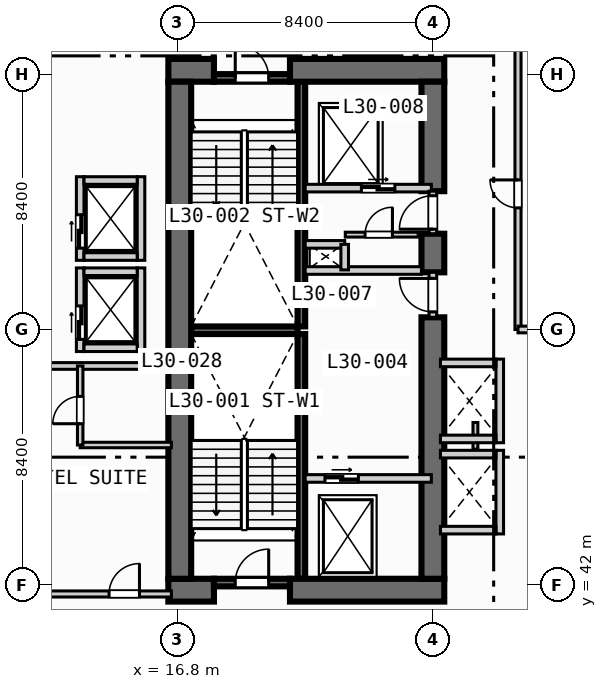
"""IFC4 building model, lengths in metres.
Left out: names, types, materials, properties, quantities, classifications, styles, units other than length and angle.
Written with IfcOpenShell. Run it as: python <this file> out.ifc"""

import sys

from ifc_helpers import new_model, si_unit, direction, frame, frame_2d, origin, place, context, subcontext, project, spatial, rectangle, extrude, element, fill, save


model = new_model("IFC4")
c1 = context("Model", 3, precision=1e-05, world=origin(), true_north=direction((0.0, 1.0)))
c2 = subcontext(c1, "Body", "Model", "MODEL_VIEW")
j1 = project(units=[si_unit("LENGTHUNIT", "METRE"), si_unit("PLANEANGLEUNIT", "RADIAN")], contexts=[c1])
p1 = place(None, origin())
s1 = spatial("IfcSite", under=j1, at=p1, CompositionType="ELEMENT")
p2 = place(p1, origin())
s2 = spatial("IfcBuilding", under=s1, at=p2, CompositionType="ELEMENT")
p3 = place(p2, frame((0.0, 0.0, 126.6)))
s3 = spatial("IfcBuildingStorey", under=s2, at=p3, CompositionType="ELEMENT", Elevation=126.6)
for number, where, z_axis, x_axis in (
    (1, (20.875, 42.2, 0.0), (0.0, 0.0, 1.0), (0.0, 1.0, 0.0)),
    (2, (20.875, 50.5, 0.0), (0.0, 0.0, 1.0), (0.0, 1.0, 0.0)),
):
    element("IfcWall", number, at=place(p3, frame(where, z_axis=z_axis, x_axis=x_axis)), inside=s3, PredefinedType="SOLIDWALL", context=c2, shape_type="SweptSolid", body=[
        extrude(rectangle(XDim=8.05, YDim=0.25, at=frame_2d((4.025, 0.0))), origin(), (0.0, 0.0, 1.0), 3.55),
    ])
p4 = place(p3, frame((17.25, 50.375, 0.0), z_axis=(0.0, 0.0, 1.0), x_axis=(1.0, 0.0, 0.0)))
e3 = element("IfcWall", 3, at=p4, inside=s3, PredefinedType="SOLIDWALL", context=c2, shape_type="SweptSolid", body=[
    extrude(rectangle(XDim=3.5, YDim=0.25, at=frame_2d((1.75, 0.0))), origin(), (0.0, 0.0, 1.0), 3.55),
])
p5 = place(p3, frame((16.5, 41.825, 0.0), z_axis=(0.0, 0.0, 1.0), x_axis=(1.0, 0.0, 0.0)))
e4 = element("IfcWall", 4, at=p5, inside=s3, PredefinedType="SHEAR", context=c2, shape_type="SweptSolid", body=[
    extrude(rectangle(XDim=1.5, YDim=0.75, at=frame_2d((0.75, 0.0))), origin(), (0.0, 0.0, 1.0), 3.55),
])
p6 = place(p3, frame((20.5, 41.825, 0.0), z_axis=(0.0, 0.0, 1.0), x_axis=(1.0, 0.0, 0.0)))
e5 = element("IfcWall", 5, at=p6, inside=s3, PredefinedType="SHEAR", context=c2, shape_type="SweptSolid", body=[
    extrude(rectangle(XDim=5.075, YDim=0.75, at=frame_2d((2.538, 0.0))), origin(), (0.0, 0.0, 1.0), 3.55),
])
p7 = place(p3, frame((16.5, 58.925, 0.0), z_axis=(0.0, 0.0, 1.0), x_axis=(1.0, 0.0, 0.0)))
e6 = element("IfcWall", 6, at=p7, inside=s3, PredefinedType="SHEAR", context=c2, shape_type="SweptSolid", body=[
    extrude(rectangle(XDim=1.5, YDim=0.75, at=frame_2d((0.75, 0.0))), origin(), (0.0, 0.0, 1.0), 3.55),
])
p8 = place(p3, frame((20.5, 58.925, 0.0), z_axis=(0.0, 0.0, 1.0), x_axis=(1.0, 0.0, 0.0)))
e7 = element("IfcWall", 7, at=p8, inside=s3, PredefinedType="SHEAR", context=c2, shape_type="SweptSolid", body=[
    extrude(rectangle(XDim=5.075, YDim=0.75, at=frame_2d((2.538, 0.0))), origin(), (0.0, 0.0, 1.0), 3.55),
])
p9 = place(p3, frame((16.875, 42.2, 0.0), z_axis=(0.0, 0.0, 1.0), x_axis=(0.0, 1.0, 0.0)))
e8 = element("IfcWall", 8, at=p9, inside=s3, PredefinedType="SHEAR", context=c2, shape_type="SweptSolid", body=[
    extrude(rectangle(XDim=16.35, YDim=0.75, at=frame_2d((8.175, 0.0))), origin(), (0.0, 0.0, 1.0), 3.55),
])
p10 = place(p3, frame((25.2, 42.2, 0.0), z_axis=(0.0, 0.0, 1.0), x_axis=(0.0, 1.0, 0.0)))
e9 = element("IfcWall", 9, at=p10, inside=s3, PredefinedType="SHEAR", context=c2, shape_type="SweptSolid", body=[
    extrude(rectangle(XDim=8.6, YDim=0.75, at=frame_2d((4.3, 0.0))), origin(), (0.0, 0.0, 1.0), 3.55),
])
p11 = place(p3, frame((25.2, 52.28, 0.0), z_axis=(0.0, 0.0, 1.0), x_axis=(0.0, 1.0, 0.0)))
e10 = element("IfcWall", 10, at=p11, inside=s3, PredefinedType="SHEAR", context=c2, shape_type="SweptSolid", body=[
    extrude(rectangle(XDim=1.27, YDim=0.75, at=frame_2d((0.635, 0.0))), origin(), (0.0, 0.0, 1.0), 3.55),
])
p12 = place(p3, frame((25.2, 54.95, 0.0), z_axis=(0.0, 0.0, 1.0), x_axis=(0.0, 1.0, 0.0)))
e11 = element("IfcWall", 11, at=p12, inside=s3, PredefinedType="SHEAR", context=c2, shape_type="SweptSolid", body=[
    extrude(rectangle(XDim=3.6, YDim=0.75, at=frame_2d((1.8, 0.0))), origin(), (0.0, 0.0, 1.0), 3.55),
])
p13 = place(p3, frame((18.0, 42.075, 0.0), z_axis=(0.0, 0.0, 1.0), x_axis=(1.0, 0.0, 0.0)))
e12 = element("IfcWall", 12, at=p13, inside=s3, PredefinedType="SOLIDWALL", context=c2, shape_type="SweptSolid", body=[
    extrude(rectangle(XDim=2.5, YDim=0.25, at=frame_2d((1.25, 0.0))), origin(), (0.0, 0.0, 1.0), 3.55),
])
p14 = place(p13, frame((0.7, 0.0, 0.0)))
e13 = element("IfcOpeningElement", 13, at=p14, cuts=e12, PredefinedType="OPENING", context=c2, shape_type="SweptSolid", body=[
    extrude(rectangle(XDim=1.1, YDim=2.15, at=frame_2d((0.55, 1.075))), frame((0.0, 0.135, 0.0), z_axis=(0.0, -1.0, 0.0), x_axis=(1.0, 0.0, 0.0)), (0.0, 0.0, 1.0), 0.27),
])
p15 = place(p3, frame((18.0, 58.675, 0.0), z_axis=(0.0, 0.0, 1.0), x_axis=(1.0, 0.0, 0.0)))
e14 = element("IfcWall", 14, at=p15, inside=s3, PredefinedType="SOLIDWALL", context=c2, shape_type="SweptSolid", body=[
    extrude(rectangle(XDim=2.5, YDim=0.25, at=frame_2d((1.25, 0.0))), origin(), (0.0, 0.0, 1.0), 3.55),
])
p16 = place(p15, frame((0.7, 0.0, 0.0)))
e15 = element("IfcOpeningElement", 15, at=p16, cuts=e14, PredefinedType="OPENING", context=c2, shape_type="SweptSolid", body=[
    extrude(rectangle(XDim=1.1, YDim=2.15, at=frame_2d((0.55, 1.075))), frame((0.0, 0.135, 0.0), z_axis=(0.0, -1.0, 0.0), x_axis=(1.0, 0.0, 0.0)), (0.0, 0.0, 1.0), 0.27),
])
p17 = place(p3, frame((21.0, 45.5, 0.0), z_axis=(0.0, 0.0, 1.0), x_axis=(1.0, 0.0, 0.0)))
e16 = element("IfcWall", 16, at=p17, inside=s3, PredefinedType="SOLIDWALL", context=c2, shape_type="SweptSolid", body=[
    extrude(rectangle(XDim=4.15, YDim=0.25, at=frame_2d((2.075, 0.0))), origin(), (0.0, 0.0, 1.0), 3.55),
])
p18 = place(p17, frame((0.65, 0.0, 0.0)))
e17 = element("IfcOpeningElement", 17, at=p18, cuts=e16, PredefinedType="OPENING", context=c2, shape_type="SweptSolid", body=[
    extrude(rectangle(XDim=1.1, YDim=2.15, at=frame_2d((0.55, 1.075))), frame((0.0, 0.135, 0.0), z_axis=(0.0, -1.0, 0.0), x_axis=(1.0, 0.0, 0.0)), (0.0, 0.0, 1.0), 0.27),
])
p19 = place(p3, frame((25.2, 50.8, 0.0), z_axis=(0.0, 0.0, 1.0), x_axis=(0.0, 1.0, 0.0)))
e18 = element("IfcWall", 18, at=p19, inside=s3, PredefinedType="SOLIDWALL", context=c2, shape_type="SweptSolid", body=[
    extrude(rectangle(XDim=1.48, YDim=0.25, at=frame_2d((0.74, 0.0))), origin(), (0.0, 0.0, 1.0), 3.55),
])
p20 = place(p19, frame((0.18, 0.0, 0.0)))
e19 = element("IfcOpeningElement", 19, at=p20, cuts=e18, PredefinedType="OPENING", context=c2, shape_type="SweptSolid", body=[
    extrude(rectangle(XDim=1.1, YDim=2.15, at=frame_2d((0.55, 1.075))), frame((0.0, 0.135, 0.0), z_axis=(0.0, -1.0, 0.0), x_axis=(1.0, 0.0, 0.0)), (0.0, 0.0, 1.0), 0.27),
])
p21 = place(p3, frame((21.0, 52.34, 0.0), z_axis=(0.0, 0.0, 1.0), x_axis=(1.0, 0.0, 0.0)))
e20 = element("IfcWall", 20, at=p21, inside=s3, PredefinedType="SOLIDWALL", context=c2, shape_type="SweptSolid", body=[
    extrude(rectangle(XDim=3.825, YDim=0.25, at=frame_2d((1.913, 0.0))), origin(), (0.0, 0.0, 1.0), 3.55),
])
p22 = place(p3, frame((21.0, 55.05, 0.0), z_axis=(0.0, 0.0, 1.0), x_axis=(1.0, 0.0, 0.0)))
e21 = element("IfcWall", 21, at=p22, inside=s3, PredefinedType="SOLIDWALL", context=c2, shape_type="SweptSolid", body=[
    extrude(rectangle(XDim=4.15, YDim=0.25, at=frame_2d((2.075, 0.0))), origin(), (0.0, 0.0, 1.0), 3.55),
])
p23 = place(p22, frame((1.85, 0.0, 0.0)))
e22 = element("IfcOpeningElement", 22, at=p23, cuts=e21, PredefinedType="OPENING", context=c2, shape_type="SweptSolid", body=[
    extrude(rectangle(XDim=1.1, YDim=2.15, at=frame_2d((0.55, 1.075))), frame((0.0, 0.135, 0.0), z_axis=(0.0, -1.0, 0.0), x_axis=(1.0, 0.0, 0.0)), (0.0, 0.0, 1.0), 0.27),
])
p24 = place(p3, frame((25.2, 53.55, 0.0), z_axis=(0.0, 0.0, 1.0), x_axis=(0.0, 1.0, 0.0)))
e23 = element("IfcWall", 23, at=p24, inside=s3, PredefinedType="SOLIDWALL", context=c2, shape_type="SweptSolid", body=[
    extrude(rectangle(XDim=1.4, YDim=0.25, at=frame_2d((0.7, 0.0))), origin(), (0.0, 0.0, 1.0), 3.55),
])
p25 = place(p24, frame((0.15, 0.0, 0.0)))
e24 = element("IfcOpeningElement", 24, at=p25, cuts=e23, PredefinedType="OPENING", context=c2, shape_type="SweptSolid", body=[
    extrude(rectangle(XDim=1.1, YDim=2.15, at=frame_2d((0.55, 1.075))), frame((0.0, 0.135, 0.0), z_axis=(0.0, -1.0, 0.0), x_axis=(1.0, 0.0, 0.0)), (0.0, 0.0, 1.0), 0.27),
])
p26 = place(p3, frame((21.0, 53.2, 0.0), z_axis=(0.0, 0.0, 1.0), x_axis=(1.0, 0.0, 0.0)))
e25 = element("IfcWall", 25, at=p26, inside=s3, PredefinedType="SOLIDWALL", context=c2, shape_type="SweptSolid", body=[
    extrude(rectangle(XDim=1.3, YDim=0.25, at=frame_2d((0.65, 0.0))), origin(), (0.0, 0.0, 1.0), 3.55),
])
p27 = place(p3, frame((22.3, 52.36, 0.0), z_axis=(0.0, 0.0, 1.0), x_axis=(0.0, 1.0, 0.0)))
e26 = element("IfcWall", 26, at=p27, inside=s3, PredefinedType="SOLIDWALL", context=c2, shape_type="SweptSolid", body=[
    extrude(rectangle(XDim=0.84, YDim=0.25, at=frame_2d((0.42, 0.0))), origin(), (0.0, 0.0, 1.0), 3.55),
])
p28 = place(p3, frame((22.32, 53.52, 0.0), z_axis=(0.0, 0.0, 1.0), x_axis=(1.0, 0.0, 0.0)))
e27 = element("IfcWall", 27, at=p28, inside=s3, PredefinedType="PARTITIONING", context=c2, shape_type="SweptSolid", body=[
    extrude(rectangle(XDim=2.4, YDim=0.16, at=frame_2d((1.2, 0.0))), origin(), (0.0, 0.0, 1.0), 3.55),
])
p29 = place(p28, frame((0.65, 0.0, 0.0)))
e28 = element("IfcOpeningElement", 28, at=p29, cuts=e27, PredefinedType="OPENING", context=c2, shape_type="SweptSolid", body=[
    extrude(rectangle(XDim=0.9, YDim=2.1, at=frame_2d((0.45, 1.05))), frame((0.0, 0.09, 0.0), z_axis=(0.0, -1.0, 0.0), x_axis=(1.0, 0.0, 0.0)), (0.0, 0.0, 1.0), 0.18),
])
p30 = place(p3, frame((13.6, 49.675, 0.0), z_axis=(0.0, 0.0, 1.0), x_axis=(0.0, 1.0, 0.0)))
e29 = element("IfcWall", 29, at=p30, inside=s3, PredefinedType="SOLIDWALL", context=c2, shape_type="SweptSolid", body=[
    extrude(rectangle(XDim=2.75, YDim=0.25, at=frame_2d((1.375, 0.0))), origin(), (0.0, 0.0, 1.0), 3.55),
])
p31 = place(p30, frame((0.4, 0.0, 0.0)))
e30 = element("IfcOpeningElement", 30, at=p31, cuts=e29, PredefinedType="OPENING", context=c2, shape_type="SweptSolid", body=[
    extrude(rectangle(XDim=1.1, YDim=2.15, at=frame_2d((0.55, 1.075))), frame((0.0, 0.135, 0.0), z_axis=(0.0, -1.0, 0.0), x_axis=(1.0, 0.0, 0.0)), (0.0, 0.0, 1.0), 0.27),
])
p32 = place(p3, frame((15.6, 49.675, 0.0), z_axis=(0.0, 0.0, 1.0), x_axis=(0.0, 1.0, 0.0)))
e31 = element("IfcWall", 31, at=p32, inside=s3, PredefinedType="SOLIDWALL", context=c2, shape_type="SweptSolid", body=[
    extrude(rectangle(XDim=2.75, YDim=0.25, at=frame_2d((1.375, 0.0))), origin(), (0.0, 0.0, 1.0), 3.55),
])
for number, where, z_axis, x_axis in (
    (32, (13.725, 49.8, 0.0), (0.0, 0.0, 1.0), (1.0, 0.0, 0.0)),
    (33, (13.725, 52.3, 0.0), (0.0, 0.0, 1.0), (1.0, 0.0, 0.0)),
):
    element("IfcWall", number, at=place(p3, frame(where, z_axis=z_axis, x_axis=x_axis)), inside=s3, PredefinedType="SOLIDWALL", context=c2, shape_type="SweptSolid", body=[
        extrude(rectangle(XDim=1.75, YDim=0.25, at=frame_2d((0.875, 0.0))), origin(), (0.0, 0.0, 1.0), 3.55),
    ])
p33 = place(p3, frame((13.6, 52.675, 0.0), z_axis=(0.0, 0.0, 1.0), x_axis=(0.0, 1.0, 0.0)))
e34 = element("IfcWall", 34, at=p33, inside=s3, PredefinedType="SOLIDWALL", context=c2, shape_type="SweptSolid", body=[
    extrude(rectangle(XDim=2.75, YDim=0.25, at=frame_2d((1.375, 0.0))), origin(), (0.0, 0.0, 1.0), 3.55),
])
p34 = place(p33, frame((0.4, 0.0, 0.0)))
e35 = element("IfcOpeningElement", 35, at=p34, cuts=e34, PredefinedType="OPENING", context=c2, shape_type="SweptSolid", body=[
    extrude(rectangle(XDim=1.1, YDim=2.15, at=frame_2d((0.55, 1.075))), frame((0.0, 0.135, 0.0), z_axis=(0.0, -1.0, 0.0), x_axis=(1.0, 0.0, 0.0)), (0.0, 0.0, 1.0), 0.27),
])
p35 = place(p3, frame((15.6, 52.675, 0.0), z_axis=(0.0, 0.0, 1.0), x_axis=(0.0, 1.0, 0.0)))
e36 = element("IfcWall", 36, at=p35, inside=s3, PredefinedType="SOLIDWALL", context=c2, shape_type="SweptSolid", body=[
    extrude(rectangle(XDim=2.75, YDim=0.25, at=frame_2d((1.375, 0.0))), origin(), (0.0, 0.0, 1.0), 3.55),
])
for number, where, z_axis, x_axis in (
    (37, (13.725, 52.8, 0.0), (0.0, 0.0, 1.0), (1.0, 0.0, 0.0)),
    (38, (13.725, 55.3, 0.0), (0.0, 0.0, 1.0), (1.0, 0.0, 0.0)),
):
    element("IfcWall", number, at=place(p3, frame(where, z_axis=z_axis, x_axis=x_axis)), inside=s3, PredefinedType="SOLIDWALL", context=c2, shape_type="SweptSolid", body=[
        extrude(rectangle(XDim=1.75, YDim=0.25, at=frame_2d((0.875, 0.0))), origin(), (0.0, 0.0, 1.0), 3.55),
    ])
p36 = place(p3, frame((27.4, 43.675, 0.0), z_axis=(0.0, 0.0, 1.0), x_axis=(0.0, 1.0, 0.0)))
e39 = element("IfcWall", 39, at=p36, inside=s3, PredefinedType="SOLIDWALL", context=c2, shape_type="SweptSolid", body=[
    extrude(rectangle(XDim=2.75, YDim=0.25, at=frame_2d((1.375, 0.0))), origin(), (0.0, 0.0, 1.0), 3.55),
])
for number, where, z_axis, x_axis in (
    (40, (25.45, 43.8, 0.0), (0.0, 0.0, 1.0), (1.0, 0.0, 0.0)),
    (41, (25.45, 46.3, 0.0), (0.0, 0.0, 1.0), (1.0, 0.0, 0.0)),
):
    element("IfcWall", number, at=place(p3, frame(where, z_axis=z_axis, x_axis=x_axis)), inside=s3, PredefinedType="SOLIDWALL", context=c2, shape_type="SweptSolid", body=[
        extrude(rectangle(XDim=1.825, YDim=0.25, at=frame_2d((0.913, 0.0))), origin(), (0.0, 0.0, 1.0), 3.55),
    ])
p37 = place(p3, frame((26.6, 46.46, 0.0), z_axis=(0.0, 0.0, 1.0), x_axis=(0.0, 1.0, 0.0)))
e42 = element("IfcWall", 42, at=p37, inside=s3, PredefinedType="PARTITIONING", context=c2, shape_type="SweptSolid", body=[
    extrude(rectangle(XDim=0.88, YDim=0.16, at=frame_2d((0.44, 0.0))), origin(), (0.0, 0.0, 1.0), 3.55),
])
p38 = place(p3, frame((27.4, 46.675, 0.0), z_axis=(0.0, 0.0, 1.0), x_axis=(0.0, 1.0, 0.0)))
e43 = element("IfcWall", 43, at=p38, inside=s3, PredefinedType="SOLIDWALL", context=c2, shape_type="SweptSolid", body=[
    extrude(rectangle(XDim=2.75, YDim=0.25, at=frame_2d((1.375, 0.0))), origin(), (0.0, 0.0, 1.0), 3.55),
])
for number, where, z_axis, x_axis in (
    (44, (25.45, 46.8, 0.0), (0.0, 0.0, 1.0), (1.0, 0.0, 0.0)),
    (45, (25.45, 49.3, 0.0), (0.0, 0.0, 1.0), (1.0, 0.0, 0.0)),
):
    element("IfcWall", number, at=place(p3, frame(where, z_axis=z_axis, x_axis=x_axis)), inside=s3, PredefinedType="SOLIDWALL", context=c2, shape_type="SweptSolid", body=[
        extrude(rectangle(XDim=1.825, YDim=0.25, at=frame_2d((0.913, 0.0))), origin(), (0.0, 0.0, 1.0), 3.55),
    ])
p39 = place(p3, frame((0.35, 41.7, 0.0), z_axis=(0.0, 0.0, 1.0), x_axis=(1.0, 0.0, 0.0)))
e46 = element("IfcWall", 46, at=p39, inside=s3, PredefinedType="PARTITIONING", context=c2, shape_type="SweptSolid", body=[
    extrude(rectangle(XDim=16.25, YDim=0.2, at=frame_2d((8.125, 0.0))), origin(), (0.0, 0.0, 1.0), 2.8),
])
p40 = place(p39, frame((14.2, 0.0, 0.0)))
e47 = element("IfcOpeningElement", 47, at=p40, cuts=e46, PredefinedType="OPENING", context=c2, shape_type="SweptSolid", body=[
    extrude(rectangle(XDim=1.0, YDim=2.15, at=frame_2d((0.5, 1.075))), frame((0.0, 0.11, 0.0), z_axis=(0.0, -1.0, 0.0), x_axis=(1.0, 0.0, 0.0)), (0.0, 0.0, 1.0), 0.22),
])
p41 = place(p3, frame((0.35, 49.2, 0.0), z_axis=(0.0, 0.0, 1.0), x_axis=(1.0, 0.0, 0.0)))
e48 = element("IfcWall", 48, at=p41, inside=s3, PredefinedType="PARTITIONING", context=c2, shape_type="SweptSolid", body=[
    extrude(rectangle(XDim=16.25, YDim=0.22, at=frame_2d((8.125, 0.0))), origin(), (0.0, 0.0, 1.0), 3.55),
])
p42 = place(p3, frame((13.6, 46.6, 0.0), z_axis=(0.0, 0.0, 1.0), x_axis=(1.0, 0.0, 0.0)))
e49 = element("IfcWall", 49, at=p42, inside=s3, PredefinedType="PLUMBINGWALL", context=c2, shape_type="SweptSolid", body=[
    extrude(rectangle(XDim=3.0, YDim=0.18, at=frame_2d((1.5, 0.0))), origin(), (0.0, 0.0, 1.0), 3.55),
])
p43 = place(p3, frame((13.6, 46.6, 0.0), z_axis=(0.0, 0.0, 1.0), x_axis=(0.0, 1.0, 0.0)))
e50 = element("IfcWall", 50, at=p43, inside=s3, PredefinedType="PLUMBINGWALL", context=c2, shape_type="SweptSolid", body=[
    extrude(rectangle(XDim=2.6, YDim=0.18, at=frame_2d((1.3, 0.0))), origin(), (0.0, 0.0, 1.0), 3.55),
])
p44 = place(p43, frame((0.7, 0.0, 0.0)))
e51 = element("IfcOpeningElement", 51, at=p44, cuts=e50, PredefinedType="OPENING", context=c2, shape_type="SweptSolid", body=[
    extrude(rectangle(XDim=0.9, YDim=2.1, at=frame_2d((0.45, 1.05))), frame((0.0, 0.1, 0.0), z_axis=(0.0, -1.0, 0.0), x_axis=(1.0, 0.0, 0.0)), (0.0, 0.0, 1.0), 0.2),
])
p45 = place(p3, frame((28.0, 50.4, 0.0), z_axis=(0.0, 0.0, 1.0), x_axis=(0.0, 1.0, 0.0)))
e52 = element("IfcWall", 52, at=p45, inside=s3, PredefinedType="PARTITIONING", context=c2, shape_type="SweptSolid", body=[
    extrude(rectangle(XDim=38.6, YDim=0.2, at=frame_2d((19.3, 0.0))), origin(), (0.0, 0.0, 1.0), 3.55),
])
p46 = place(p45, frame((4.0, 0.0, 0.0)))
e53 = element("IfcOpeningElement", 53, at=p46, cuts=e52, PredefinedType="OPENING", context=c2, shape_type="SweptSolid", body=[
    extrude(rectangle(XDim=0.92, YDim=2.1, at=frame_2d((0.46, 1.05))), frame((0.0, 0.11, 0.0), z_axis=(0.0, -1.0, 0.0), x_axis=(1.0, 0.0, 0.0)), (0.0, 0.0, 1.0), 0.22),
])
p47 = place(p3, frame((28.0, 50.4, 0.0), z_axis=(0.0, 0.0, 1.0), x_axis=(1.0, 0.0, 0.0)))
e54 = element("IfcWall", 54, at=p47, inside=s3, PredefinedType="PARTITIONING", context=c2, shape_type="SweptSolid", body=[
    extrude(rectangle(XDim=5.3, YDim=0.22, at=frame_2d((2.65, 0.0))), origin(), (0.0, 0.0, 1.0), 3.087),
])
p48 = place(p14, origin())
e55 = element("IfcDoor", 55, at=p48, inside=s3, OperationType="SINGLE_SWING_RIGHT", PredefinedType="DOOR", context=c2, shape_type="SweptSolid", body=[
    extrude(rectangle(XDim=1.1, YDim=2.15, at=frame_2d((0.55, 1.075))), frame((0.0, 0.025, 0.0), z_axis=(0.0, -1.0, 0.0), x_axis=(1.0, 0.0, 0.0)), (0.0, 0.0, 1.0), 0.05),
])
fill(e13, e55)
p49 = place(p16, origin())
e56 = element("IfcDoor", 56, at=p49, inside=s3, OperationType="SINGLE_SWING_LEFT", PredefinedType="DOOR", context=c2, shape_type="SweptSolid", body=[
    extrude(rectangle(XDim=1.1, YDim=2.15, at=frame_2d((0.55, 1.075))), frame((0.0, 0.025, 0.0), z_axis=(0.0, -1.0, 0.0), x_axis=(1.0, 0.0, 0.0)), (0.0, 0.0, 1.0), 0.05),
])
fill(e15, e56)
p50 = place(p18, origin())
e57 = element("IfcDoor", 57, at=p50, inside=s3, OperationType="SLIDING_TO_LEFT", PredefinedType="DOOR", context=c2, shape_type="SweptSolid", body=[
    extrude(rectangle(XDim=1.1, YDim=2.15, at=frame_2d((0.55, 1.075))), frame((0.0, 0.025, 0.0), z_axis=(0.0, -1.0, 0.0), x_axis=(1.0, 0.0, 0.0)), (0.0, 0.0, 1.0), 0.05),
])
fill(e17, e57)
p51 = place(p20, origin())
e58 = element("IfcDoor", 58, at=p51, inside=s3, OperationType="SINGLE_SWING_RIGHT", PredefinedType="DOOR", context=c2, shape_type="SweptSolid", body=[
    extrude(rectangle(XDim=1.1, YDim=2.15, at=frame_2d((0.55, 1.075))), frame((0.0, 0.025, 0.0), z_axis=(0.0, -1.0, 0.0), x_axis=(1.0, 0.0, 0.0)), (0.0, 0.0, 1.0), 0.05),
])
fill(e19, e58)
p52 = place(p23, origin())
e59 = element("IfcDoor", 59, at=p52, inside=s3, OperationType="SLIDING_TO_LEFT", PredefinedType="DOOR", context=c2, shape_type="SweptSolid", body=[
    extrude(rectangle(XDim=1.1, YDim=2.15, at=frame_2d((0.55, 1.075))), frame((0.0, 0.025, 0.0), z_axis=(0.0, -1.0, 0.0), x_axis=(1.0, 0.0, 0.0)), (0.0, 0.0, 1.0), 0.05),
])
fill(e22, e59)
p53 = place(p25, origin())
e60 = element("IfcDoor", 60, at=p53, inside=s3, OperationType="SINGLE_SWING_LEFT", PredefinedType="DOOR", context=c2, shape_type="SweptSolid", body=[
    extrude(rectangle(XDim=1.1, YDim=2.15, at=frame_2d((0.55, 1.075))), frame((0.0, 0.025, 0.0), z_axis=(0.0, -1.0, 0.0), x_axis=(1.0, 0.0, 0.0)), (0.0, 0.0, 1.0), 0.05),
])
fill(e24, e60)
p54 = place(p29, origin())
e61 = element("IfcDoor", 61, at=p54, inside=s3, OperationType="SINGLE_SWING_RIGHT", PredefinedType="DOOR", context=c2, shape_type="SweptSolid", body=[
    extrude(rectangle(XDim=0.9, YDim=2.1, at=frame_2d((0.45, 1.05))), frame((0.0, 0.025, 0.0), z_axis=(0.0, -1.0, 0.0), x_axis=(1.0, 0.0, 0.0)), (0.0, 0.0, 1.0), 0.05),
])
fill(e28, e61)
p55 = place(p31, origin())
e62 = element("IfcDoor", 62, at=p55, inside=s3, OperationType="SLIDING_TO_LEFT", PredefinedType="DOOR", context=c2, shape_type="SweptSolid", body=[
    extrude(rectangle(XDim=1.1, YDim=2.15, at=frame_2d((0.55, 1.075))), frame((0.0, 0.025, 0.0), z_axis=(0.0, -1.0, 0.0), x_axis=(1.0, 0.0, 0.0)), (0.0, 0.0, 1.0), 0.05),
])
fill(e30, e62)
p56 = place(p34, origin())
e63 = element("IfcDoor", 63, at=p56, inside=s3, OperationType="SLIDING_TO_LEFT", PredefinedType="DOOR", context=c2, shape_type="SweptSolid", body=[
    extrude(rectangle(XDim=1.1, YDim=2.15, at=frame_2d((0.55, 1.075))), frame((0.0, 0.025, 0.0), z_axis=(0.0, -1.0, 0.0), x_axis=(1.0, 0.0, 0.0)), (0.0, 0.0, 1.0), 0.05),
])
fill(e35, e63)
p57 = place(p40, origin())
e64 = element("IfcDoor", 64, at=p57, inside=s3, OperationType="SINGLE_SWING_RIGHT", PredefinedType="DOOR", context=c2, shape_type="SweptSolid", body=[
    extrude(rectangle(XDim=1.0, YDim=2.15, at=frame_2d((0.5, 1.075))), frame((0.0, 0.025, 0.0), z_axis=(0.0, -1.0, 0.0), x_axis=(1.0, 0.0, 0.0)), (0.0, 0.0, 1.0), 0.05),
])
fill(e47, e64)
p58 = place(p44, origin())
e65 = element("IfcDoor", 65, at=p58, inside=s3, OperationType="SINGLE_SWING_LEFT", PredefinedType="DOOR", context=c2, shape_type="SweptSolid", body=[
    extrude(rectangle(XDim=0.9, YDim=2.1, at=frame_2d((0.45, 1.05))), frame((0.0, 0.025, 0.0), z_axis=(0.0, -1.0, 0.0), x_axis=(1.0, 0.0, 0.0)), (0.0, 0.0, 1.0), 0.05),
])
fill(e51, e65)
p59 = place(p46, origin())
e66 = element("IfcDoor", 66, at=p59, inside=s3, OperationType="SINGLE_SWING_RIGHT", PredefinedType="DOOR", context=c2, shape_type="SweptSolid", body=[
    extrude(rectangle(XDim=0.92, YDim=2.1, at=frame_2d((0.46, 1.05))), frame((0.0, 0.025, 0.0), z_axis=(0.0, -1.0, 0.0), x_axis=(1.0, 0.0, 0.0)), (0.0, 0.0, 1.0), 0.05),
])
fill(e53, e66)
save(model, sys.argv[1])
